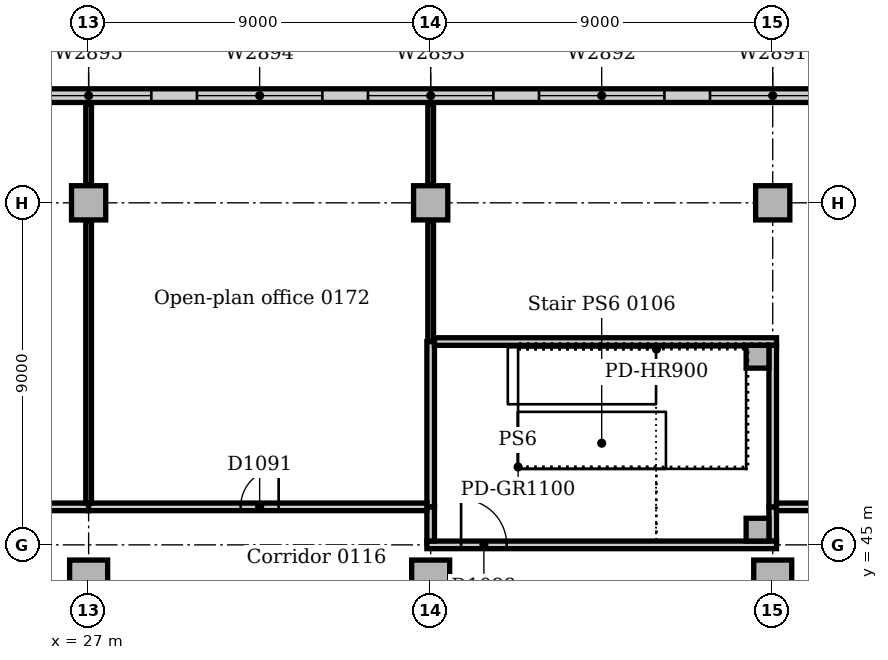
"""IFC4 building model, lengths in metres.
Left out: names, types, materials, properties, quantities, classifications, styles, units other than length and angle.
Written with IfcOpenShell. Run it as: python <this file> out.ifc"""

import sys

from ifc_helpers import new_model, si_unit, direction, frame, frame_2d, origin, origin_2d, place, context, subcontext, project, spatial, rectangle, extrude, element, fill, save


model = new_model("IFC4")
c1 = context("Model", 3, precision=1e-05, world=origin(), true_north=direction((0.0, 1.0)))
c2 = subcontext(c1, "Body", "Model", "MODEL_VIEW")
j1 = project(units=[si_unit("LENGTHUNIT", "METRE"), si_unit("PLANEANGLEUNIT", "RADIAN")], contexts=[c1])
p1 = place(None, origin())
s1 = spatial("IfcSite", under=j1, at=p1, CompositionType="ELEMENT")
p2 = place(p1, origin())
s2 = spatial("IfcBuilding", under=s1, at=p2, CompositionType="ELEMENT")
p3 = place(p2, frame((0.0, 0.0, 6.0)))
s3 = spatial("IfcBuildingStorey", under=s2, at=p3, CompositionType="ELEMENT", Elevation=6.0)
for number, where, z_axis, x_axis in (
    (1, (27.0, 44.1, 0.0), (0.0, 0.0, 1.0), (1.0, 0.0, 0.0)),
    (2, (36.0, 44.1, 0.0), (0.0, 0.0, 1.0), (1.0, 0.0, 0.0)),
    (3, (45.0, 44.1, 0.0), (0.0, 0.0, 1.0), (1.0, 0.0, 0.0)),
):
    element("IfcColumn", number, at=place(p3, frame(where, z_axis=z_axis, x_axis=x_axis)), inside=s3, PredefinedType="COLUMN", context=c2, shape_type="SweptSolid", body=[
        extrude(rectangle(XDim=1.0, YDim=1.0, at=origin_2d()), origin(), (0.0, 0.0, 1.0), 4.7),
    ])
for number, where, z_axis, x_axis in (
    (4, (27.0, 54.0, 0.0), (0.0, 0.0, 1.0), (1.0, 0.0, 0.0)),
    (5, (36.0, 54.0, 0.0), (0.0, 0.0, 1.0), (1.0, 0.0, 0.0)),
    (6, (45.0, 54.0, 0.0), (0.0, 0.0, 1.0), (1.0, 0.0, 0.0)),
):
    element("IfcColumn", number, at=place(p3, frame(where, z_axis=z_axis, x_axis=x_axis)), inside=s3, PredefinedType="COLUMN", context=c2, shape_type="SweptSolid", body=[
        extrude(rectangle(XDim=0.9, YDim=0.9, at=origin_2d()), origin(), (0.0, 0.0, 1.0), 4.7),
    ])
p4 = place(p3, frame((63.0, 56.82, 0.0), z_axis=(0.0, 0.0, 1.0), x_axis=(-1.0, 0.0, 0.0)))
e7 = element("IfcWall", 7, at=p4, inside=s3, PredefinedType="STANDARD", context=c2, shape_type="SweptSolid", body=[
    extrude(rectangle(XDim=144.0, YDim=0.36, at=frame_2d((72.0, 0.0))), origin(), (0.0, 0.0, 1.0), 4.7),
])
p5 = place(p4, frame((2.85, 0.0, 0.9)))
e8 = element("IfcOpeningElement", 8, at=p5, cuts=e7, PredefinedType="OPENING", context=c2, shape_type="SweptSolid", body=[
    extrude(rectangle(XDim=3.3, YDim=2.4, at=frame_2d((1.65, 1.2))), frame((0.0, 0.19, 0.0), z_axis=(0.0, -1.0, 0.0), x_axis=(1.0, 0.0, 0.0)), (0.0, 0.0, 1.0), 0.38),
])
p6 = place(p4, frame((7.35, 0.0, 0.9)))
e9 = element("IfcOpeningElement", 9, at=p6, cuts=e7, PredefinedType="OPENING", context=c2, shape_type="SweptSolid", body=[
    extrude(rectangle(XDim=3.3, YDim=2.4, at=frame_2d((1.65, 1.2))), frame((0.0, 0.19, 0.0), z_axis=(0.0, -1.0, 0.0), x_axis=(1.0, 0.0, 0.0)), (0.0, 0.0, 1.0), 0.38),
])
p7 = place(p4, frame((11.85, 0.0, 0.9)))
e10 = element("IfcOpeningElement", 10, at=p7, cuts=e7, PredefinedType="OPENING", context=c2, shape_type="SweptSolid", body=[
    extrude(rectangle(XDim=3.3, YDim=2.4, at=frame_2d((1.65, 1.2))), frame((0.0, 0.19, 0.0), z_axis=(0.0, -1.0, 0.0), x_axis=(1.0, 0.0, 0.0)), (0.0, 0.0, 1.0), 0.38),
])
p8 = place(p4, frame((16.35, 0.0, 0.9)))
e11 = element("IfcOpeningElement", 11, at=p8, cuts=e7, PredefinedType="OPENING", context=c2, shape_type="SweptSolid", body=[
    extrude(rectangle(XDim=3.3, YDim=2.4, at=frame_2d((1.65, 1.2))), frame((0.0, 0.19, 0.0), z_axis=(0.0, -1.0, 0.0), x_axis=(1.0, 0.0, 0.0)), (0.0, 0.0, 1.0), 0.38),
])
p9 = place(p4, frame((20.85, 0.0, 0.9)))
e12 = element("IfcOpeningElement", 12, at=p9, cuts=e7, PredefinedType="OPENING", context=c2, shape_type="SweptSolid", body=[
    extrude(rectangle(XDim=3.3, YDim=2.4, at=frame_2d((1.65, 1.2))), frame((0.0, 0.19, 0.0), z_axis=(0.0, -1.0, 0.0), x_axis=(1.0, 0.0, 0.0)), (0.0, 0.0, 1.0), 0.38),
])
p10 = place(p4, frame((25.35, 0.0, 0.9)))
e13 = element("IfcOpeningElement", 13, at=p10, cuts=e7, PredefinedType="OPENING", context=c2, shape_type="SweptSolid", body=[
    extrude(rectangle(XDim=3.3, YDim=2.4, at=frame_2d((1.65, 1.2))), frame((0.0, 0.19, 0.0), z_axis=(0.0, -1.0, 0.0), x_axis=(1.0, 0.0, 0.0)), (0.0, 0.0, 1.0), 0.38),
])
p11 = place(p4, frame((29.85, 0.0, 0.9)))
e14 = element("IfcOpeningElement", 14, at=p11, cuts=e7, PredefinedType="OPENING", context=c2, shape_type="SweptSolid", body=[
    extrude(rectangle(XDim=3.3, YDim=2.4, at=frame_2d((1.65, 1.2))), frame((0.0, 0.19, 0.0), z_axis=(0.0, -1.0, 0.0), x_axis=(1.0, 0.0, 0.0)), (0.0, 0.0, 1.0), 0.38),
])
p12 = place(p4, frame((34.35, 0.0, 0.9)))
e15 = element("IfcOpeningElement", 15, at=p12, cuts=e7, PredefinedType="OPENING", context=c2, shape_type="SweptSolid", body=[
    extrude(rectangle(XDim=3.3, YDim=2.4, at=frame_2d((1.65, 1.2))), frame((0.0, 0.19, 0.0), z_axis=(0.0, -1.0, 0.0), x_axis=(1.0, 0.0, 0.0)), (0.0, 0.0, 1.0), 0.38),
])
p13 = place(p4, frame((38.85, 0.0, 0.9)))
e16 = element("IfcOpeningElement", 16, at=p13, cuts=e7, PredefinedType="OPENING", context=c2, shape_type="SweptSolid", body=[
    extrude(rectangle(XDim=3.3, YDim=2.4, at=frame_2d((1.65, 1.2))), frame((0.0, 0.19, 0.0), z_axis=(0.0, -1.0, 0.0), x_axis=(1.0, 0.0, 0.0)), (0.0, 0.0, 1.0), 0.38),
])
p14 = place(p4, frame((43.35, 0.0, 0.9)))
e17 = element("IfcOpeningElement", 17, at=p14, cuts=e7, PredefinedType="OPENING", context=c2, shape_type="SweptSolid", body=[
    extrude(rectangle(XDim=3.3, YDim=2.4, at=frame_2d((1.65, 1.2))), frame((0.0, 0.19, 0.0), z_axis=(0.0, -1.0, 0.0), x_axis=(1.0, 0.0, 0.0)), (0.0, 0.0, 1.0), 0.38),
])
p15 = place(p4, frame((47.85, 0.0, 0.9)))
e18 = element("IfcOpeningElement", 18, at=p15, cuts=e7, PredefinedType="OPENING", context=c2, shape_type="SweptSolid", body=[
    extrude(rectangle(XDim=3.3, YDim=2.4, at=frame_2d((1.65, 1.2))), frame((0.0, 0.19, 0.0), z_axis=(0.0, -1.0, 0.0), x_axis=(1.0, 0.0, 0.0)), (0.0, 0.0, 1.0), 0.38),
])
p16 = place(p4, frame((52.35, 0.0, 0.9)))
e19 = element("IfcOpeningElement", 19, at=p16, cuts=e7, PredefinedType="OPENING", context=c2, shape_type="SweptSolid", body=[
    extrude(rectangle(XDim=3.3, YDim=2.4, at=frame_2d((1.65, 1.2))), frame((0.0, 0.19, 0.0), z_axis=(0.0, -1.0, 0.0), x_axis=(1.0, 0.0, 0.0)), (0.0, 0.0, 1.0), 0.38),
])
p17 = place(p4, frame((56.85, 0.0, 0.9)))
e20 = element("IfcOpeningElement", 20, at=p17, cuts=e7, PredefinedType="OPENING", context=c2, shape_type="SweptSolid", body=[
    extrude(rectangle(XDim=3.3, YDim=2.4, at=frame_2d((1.65, 1.2))), frame((0.0, 0.19, 0.0), z_axis=(0.0, -1.0, 0.0), x_axis=(1.0, 0.0, 0.0)), (0.0, 0.0, 1.0), 0.38),
])
p18 = place(p4, frame((61.35, 0.0, 0.9)))
e21 = element("IfcOpeningElement", 21, at=p18, cuts=e7, PredefinedType="OPENING", context=c2, shape_type="SweptSolid", body=[
    extrude(rectangle(XDim=3.3, YDim=2.4, at=frame_2d((1.65, 1.2))), frame((0.0, 0.19, 0.0), z_axis=(0.0, -1.0, 0.0), x_axis=(1.0, 0.0, 0.0)), (0.0, 0.0, 1.0), 0.38),
])
p19 = place(p4, frame((65.85, 0.0, 0.9)))
e22 = element("IfcOpeningElement", 22, at=p19, cuts=e7, PredefinedType="OPENING", context=c2, shape_type="SweptSolid", body=[
    extrude(rectangle(XDim=3.3, YDim=2.4, at=frame_2d((1.65, 1.2))), frame((0.0, 0.19, 0.0), z_axis=(0.0, -1.0, 0.0), x_axis=(1.0, 0.0, 0.0)), (0.0, 0.0, 1.0), 0.38),
])
p20 = place(p4, frame((70.35, 0.0, 0.9)))
e23 = element("IfcOpeningElement", 23, at=p20, cuts=e7, PredefinedType="OPENING", context=c2, shape_type="SweptSolid", body=[
    extrude(rectangle(XDim=3.3, YDim=2.4, at=frame_2d((1.65, 1.2))), frame((0.0, 0.19, 0.0), z_axis=(0.0, -1.0, 0.0), x_axis=(1.0, 0.0, 0.0)), (0.0, 0.0, 1.0), 0.38),
])
p21 = place(p4, frame((74.85, 0.0, 0.9)))
e24 = element("IfcOpeningElement", 24, at=p21, cuts=e7, PredefinedType="OPENING", context=c2, shape_type="SweptSolid", body=[
    extrude(rectangle(XDim=3.3, YDim=2.4, at=frame_2d((1.65, 1.2))), frame((0.0, 0.19, 0.0), z_axis=(0.0, -1.0, 0.0), x_axis=(1.0, 0.0, 0.0)), (0.0, 0.0, 1.0), 0.38),
])
p22 = place(p4, frame((79.35, 0.0, 0.9)))
e25 = element("IfcOpeningElement", 25, at=p22, cuts=e7, PredefinedType="OPENING", context=c2, shape_type="SweptSolid", body=[
    extrude(rectangle(XDim=3.3, YDim=2.4, at=frame_2d((1.65, 1.2))), frame((0.0, 0.19, 0.0), z_axis=(0.0, -1.0, 0.0), x_axis=(1.0, 0.0, 0.0)), (0.0, 0.0, 1.0), 0.38),
])
p23 = place(p4, frame((83.85, 0.0, 0.9)))
e26 = element("IfcOpeningElement", 26, at=p23, cuts=e7, PredefinedType="OPENING", context=c2, shape_type="SweptSolid", body=[
    extrude(rectangle(XDim=3.3, YDim=2.4, at=frame_2d((1.65, 1.2))), frame((0.0, 0.19, 0.0), z_axis=(0.0, -1.0, 0.0), x_axis=(1.0, 0.0, 0.0)), (0.0, 0.0, 1.0), 0.38),
])
p24 = place(p4, frame((88.35, 0.0, 0.9)))
e27 = element("IfcOpeningElement", 27, at=p24, cuts=e7, PredefinedType="OPENING", context=c2, shape_type="SweptSolid", body=[
    extrude(rectangle(XDim=3.3, YDim=2.4, at=frame_2d((1.65, 1.2))), frame((0.0, 0.19, 0.0), z_axis=(0.0, -1.0, 0.0), x_axis=(1.0, 0.0, 0.0)), (0.0, 0.0, 1.0), 0.38),
])
p25 = place(p4, frame((92.85, 0.0, 0.9)))
e28 = element("IfcOpeningElement", 28, at=p25, cuts=e7, PredefinedType="OPENING", context=c2, shape_type="SweptSolid", body=[
    extrude(rectangle(XDim=3.3, YDim=2.4, at=frame_2d((1.65, 1.2))), frame((0.0, 0.19, 0.0), z_axis=(0.0, -1.0, 0.0), x_axis=(1.0, 0.0, 0.0)), (0.0, 0.0, 1.0), 0.38),
])
p26 = place(p4, frame((97.35, 0.0, 0.9)))
e29 = element("IfcOpeningElement", 29, at=p26, cuts=e7, PredefinedType="OPENING", context=c2, shape_type="SweptSolid", body=[
    extrude(rectangle(XDim=3.3, YDim=2.4, at=frame_2d((1.65, 1.2))), frame((0.0, 0.19, 0.0), z_axis=(0.0, -1.0, 0.0), x_axis=(1.0, 0.0, 0.0)), (0.0, 0.0, 1.0), 0.38),
])
p27 = place(p4, frame((101.85, 0.0, 0.9)))
e30 = element("IfcOpeningElement", 30, at=p27, cuts=e7, PredefinedType="OPENING", context=c2, shape_type="SweptSolid", body=[
    extrude(rectangle(XDim=3.3, YDim=2.4, at=frame_2d((1.65, 1.2))), frame((0.0, 0.19, 0.0), z_axis=(0.0, -1.0, 0.0), x_axis=(1.0, 0.0, 0.0)), (0.0, 0.0, 1.0), 0.38),
])
p28 = place(p4, frame((106.35, 0.0, 0.9)))
e31 = element("IfcOpeningElement", 31, at=p28, cuts=e7, PredefinedType="OPENING", context=c2, shape_type="SweptSolid", body=[
    extrude(rectangle(XDim=3.3, YDim=2.4, at=frame_2d((1.65, 1.2))), frame((0.0, 0.19, 0.0), z_axis=(0.0, -1.0, 0.0), x_axis=(1.0, 0.0, 0.0)), (0.0, 0.0, 1.0), 0.38),
])
p29 = place(p4, frame((110.85, 0.0, 0.9)))
e32 = element("IfcOpeningElement", 32, at=p29, cuts=e7, PredefinedType="OPENING", context=c2, shape_type="SweptSolid", body=[
    extrude(rectangle(XDim=3.3, YDim=2.4, at=frame_2d((1.65, 1.2))), frame((0.0, 0.19, 0.0), z_axis=(0.0, -1.0, 0.0), x_axis=(1.0, 0.0, 0.0)), (0.0, 0.0, 1.0), 0.38),
])
p30 = place(p4, frame((115.35, 0.0, 0.9)))
e33 = element("IfcOpeningElement", 33, at=p30, cuts=e7, PredefinedType="OPENING", context=c2, shape_type="SweptSolid", body=[
    extrude(rectangle(XDim=3.3, YDim=2.4, at=frame_2d((1.65, 1.2))), frame((0.0, 0.19, 0.0), z_axis=(0.0, -1.0, 0.0), x_axis=(1.0, 0.0, 0.0)), (0.0, 0.0, 1.0), 0.38),
])
p31 = place(p4, frame((119.85, 0.0, 0.9)))
e34 = element("IfcOpeningElement", 34, at=p31, cuts=e7, PredefinedType="OPENING", context=c2, shape_type="SweptSolid", body=[
    extrude(rectangle(XDim=3.3, YDim=2.4, at=frame_2d((1.65, 1.2))), frame((0.0, 0.19, 0.0), z_axis=(0.0, -1.0, 0.0), x_axis=(1.0, 0.0, 0.0)), (0.0, 0.0, 1.0), 0.38),
])
p32 = place(p4, frame((124.35, 0.0, 0.9)))
e35 = element("IfcOpeningElement", 35, at=p32, cuts=e7, PredefinedType="OPENING", context=c2, shape_type="SweptSolid", body=[
    extrude(rectangle(XDim=3.3, YDim=2.4, at=frame_2d((1.65, 1.2))), frame((0.0, 0.19, 0.0), z_axis=(0.0, -1.0, 0.0), x_axis=(1.0, 0.0, 0.0)), (0.0, 0.0, 1.0), 0.38),
])
p33 = place(p4, frame((128.85, 0.0, 0.9)))
e36 = element("IfcOpeningElement", 36, at=p33, cuts=e7, PredefinedType="OPENING", context=c2, shape_type="SweptSolid", body=[
    extrude(rectangle(XDim=3.3, YDim=2.4, at=frame_2d((1.65, 1.2))), frame((0.0, 0.19, 0.0), z_axis=(0.0, -1.0, 0.0), x_axis=(1.0, 0.0, 0.0)), (0.0, 0.0, 1.0), 0.38),
])
p34 = place(p4, frame((133.35, 0.0, 0.9)))
e37 = element("IfcOpeningElement", 37, at=p34, cuts=e7, PredefinedType="OPENING", context=c2, shape_type="SweptSolid", body=[
    extrude(rectangle(XDim=3.3, YDim=2.4, at=frame_2d((1.65, 1.2))), frame((0.0, 0.19, 0.0), z_axis=(0.0, -1.0, 0.0), x_axis=(1.0, 0.0, 0.0)), (0.0, 0.0, 1.0), 0.38),
])
p35 = place(p4, frame((137.85, 0.0, 0.9)))
e38 = element("IfcOpeningElement", 38, at=p35, cuts=e7, PredefinedType="OPENING", context=c2, shape_type="SweptSolid", body=[
    extrude(rectangle(XDim=3.3, YDim=2.4, at=frame_2d((1.65, 1.2))), frame((0.0, 0.19, 0.0), z_axis=(0.0, -1.0, 0.0), x_axis=(1.0, 0.0, 0.0)), (0.0, 0.0, 1.0), 0.38),
])
for number, where, z_axis, x_axis in (
    (39, (44.6, 49.95, 0.0), (0.0, 0.0, 1.0), (1.0, 0.0, 0.0)),
    (40, (44.6, 45.4, 0.0), (0.0, 0.0, 1.0), (1.0, 0.0, 0.0)),
):
    element("IfcColumn", number, at=place(p3, frame(where, z_axis=z_axis, x_axis=x_axis)), inside=s3, PredefinedType="COLUMN", context=c2, shape_type="SweptSolid", body=[
        extrude(rectangle(XDim=0.6, YDim=0.6, at=origin_2d()), origin(), (0.0, 0.0, 1.0), 5.0),
    ])
p36 = place(p3, frame((45.0, 45.1, 0.0), z_axis=(0.0, 0.0, 1.0), x_axis=(0.0, 1.0, 0.0)))
e41 = element("IfcWall", 41, at=p36, inside=s3, PredefinedType="SOLIDWALL", context=c2, shape_type="SweptSolid", body=[
    extrude(rectangle(XDim=0.9, YDim=0.2, at=frame_2d((0.45, 0.0))), origin(), (0.0, 0.0, 1.0), 4.7),
])
p37 = place(p3, frame((35.9, 45.0, 0.0), z_axis=(0.0, 0.0, 1.0), x_axis=(1.0, 0.0, 0.0)))
e42 = element("IfcWall", 42, at=p37, inside=s3, PredefinedType="SOLIDWALL", context=c2, shape_type="SweptSolid", body=[
    extrude(rectangle(XDim=9.2, YDim=0.2, at=frame_2d((4.6, 0.0))), origin(), (0.0, 0.0, 1.0), 4.7),
])
p38 = place(p37, frame((0.9, 0.0, 0.0)))
e43 = element("IfcOpeningElement", 43, at=p38, cuts=e42, PredefinedType="OPENING", context=c2, shape_type="SweptSolid", body=[
    extrude(rectangle(XDim=1.2, YDim=2.1, at=frame_2d((0.6, 1.05))), frame((0.0, 0.11, 0.0), z_axis=(0.0, -1.0, 0.0), x_axis=(1.0, 0.0, 0.0)), (0.0, 0.0, 1.0), 0.22),
])
p39 = place(p3, frame((36.0, 45.1, 0.0), z_axis=(0.0, 0.0, 1.0), x_axis=(0.0, 1.0, 0.0)))
e44 = element("IfcWall", 44, at=p39, inside=s3, PredefinedType="SOLIDWALL", context=c2, shape_type="SweptSolid", body=[
    extrude(rectangle(XDim=0.9, YDim=0.2, at=frame_2d((0.45, 0.0))), origin(), (0.0, 0.0, 1.0), 4.7),
])
p40 = place(p3, frame((36.0, 46.0, 0.0), z_axis=(0.0, 0.0, 1.0), x_axis=(0.0, 1.0, 0.0)))
e45 = element("IfcWall", 45, at=p40, inside=s3, PredefinedType="SOLIDWALL", context=c2, shape_type="SweptSolid", body=[
    extrude(rectangle(XDim=4.35, YDim=0.2, at=frame_2d((2.175, 0.0))), origin(), (0.0, 0.0, 1.0), 4.7),
])
p41 = place(p3, frame((36.1, 50.35, 0.0), z_axis=(0.0, 0.0, 1.0), x_axis=(1.0, 0.0, 0.0)))
e46 = element("IfcWall", 46, at=p41, inside=s3, PredefinedType="SOLIDWALL", context=c2, shape_type="SweptSolid", body=[
    extrude(rectangle(XDim=9.0, YDim=0.2, at=frame_2d((4.5, 0.0))), origin(), (0.0, 0.0, 1.0), 4.7),
])
p42 = place(p3, frame((45.0, 46.0, 0.0), z_axis=(0.0, 0.0, 1.0), x_axis=(0.0, 1.0, 0.0)))
e47 = element("IfcWall", 47, at=p42, inside=s3, PredefinedType="SOLIDWALL", context=c2, shape_type="SweptSolid", body=[
    extrude(rectangle(XDim=4.25, YDim=0.2, at=frame_2d((2.125, 0.0))), origin(), (0.0, 0.0, 1.0), 4.7),
])
p43 = place(p3, frame((18.0, 46.0, 0.0), z_axis=(0.0, 0.0, 1.0), x_axis=(1.0, 0.0, 0.0)))
e48 = element("IfcWall", 48, at=p43, inside=s3, PredefinedType="PARTITIONING", context=c2, shape_type="SweptSolid", body=[
    extrude(rectangle(XDim=9.0, YDim=0.2, at=frame_2d((4.5, 0.0))), origin(), (0.0, 0.0, 1.0), 4.7),
])
p44 = place(p43, frame((4.0, 0.0, 0.0)))
e49 = element("IfcOpeningElement", 49, at=p44, cuts=e48, PredefinedType="OPENING", context=c2, shape_type="SweptSolid", body=[
    extrude(rectangle(XDim=1.0, YDim=2.1, at=frame_2d((0.5, 1.05))), frame((0.0, 0.11, 0.0), z_axis=(0.0, -1.0, 0.0), x_axis=(1.0, 0.0, 0.0)), (0.0, 0.0, 1.0), 0.22),
])
p45 = place(p3, frame((27.0, 46.0, 0.0), z_axis=(0.0, 0.0, 1.0), x_axis=(1.0, 0.0, 0.0)))
e50 = element("IfcWall", 50, at=p45, inside=s3, PredefinedType="PARTITIONING", context=c2, shape_type="SweptSolid", body=[
    extrude(rectangle(XDim=8.9, YDim=0.2, at=frame_2d((4.45, 0.0))), origin(), (0.0, 0.0, 1.0), 4.7),
])
p46 = place(p45, frame((4.0, 0.0, 0.0)))
e51 = element("IfcOpeningElement", 51, at=p46, cuts=e50, PredefinedType="OPENING", context=c2, shape_type="SweptSolid", body=[
    extrude(rectangle(XDim=1.0, YDim=2.1, at=frame_2d((0.5, 1.05))), frame((0.0, 0.11, 0.0), z_axis=(0.0, -1.0, 0.0), x_axis=(1.0, 0.0, 0.0)), (0.0, 0.0, 1.0), 0.22),
])
p47 = place(p3, frame((45.1, 46.0, 0.0), z_axis=(0.0, 0.0, 1.0), x_axis=(1.0, 0.0, 0.0)))
e52 = element("IfcWall", 52, at=p47, inside=s3, PredefinedType="PARTITIONING", context=c2, shape_type="SweptSolid", body=[
    extrude(rectangle(XDim=8.8, YDim=0.2, at=frame_2d((4.4, 0.0))), origin(), (0.0, 0.0, 1.0), 4.7),
])
p48 = place(p47, frame((3.5, 0.0, 0.0)))
e53 = element("IfcOpeningElement", 53, at=p48, cuts=e52, PredefinedType="OPENING", context=c2, shape_type="SweptSolid", body=[
    extrude(rectangle(XDim=1.8, YDim=2.1, at=frame_2d((0.9, 1.05))), frame((0.0, 0.11, 0.0), z_axis=(0.0, -1.0, 0.0), x_axis=(1.0, 0.0, 0.0)), (0.0, 0.0, 1.0), 0.22),
])
p49 = place(p3, frame((27.0, 46.1, 0.0), z_axis=(0.0, 0.0, 1.0), x_axis=(0.0, 1.0, 0.0)))
e54 = element("IfcWall", 54, at=p49, inside=s3, PredefinedType="PARTITIONING", context=c2, shape_type="SweptSolid", body=[
    extrude(rectangle(XDim=7.43, YDim=0.15, at=frame_2d((3.715, 0.0))), origin(), (0.0, 0.0, 1.0), 4.7),
])
p50 = place(p3, frame((27.0, 54.47, 0.0), z_axis=(0.0, 0.0, 1.0), x_axis=(0.0, 1.0, 0.0)))
e55 = element("IfcWall", 55, at=p50, inside=s3, PredefinedType="PARTITIONING", context=c2, shape_type="SweptSolid", body=[
    extrude(rectangle(XDim=2.13, YDim=0.15, at=frame_2d((1.065, 0.0))), origin(), (0.0, 0.0, 1.0), 4.7),
])
p51 = place(p3, frame((36.0, 50.35, 0.0), z_axis=(0.0, 0.0, 1.0), x_axis=(0.0, 1.0, 0.0)))
e56 = element("IfcWall", 56, at=p51, inside=s3, PredefinedType="PARTITIONING", context=c2, shape_type="SweptSolid", body=[
    extrude(rectangle(XDim=3.18, YDim=0.15, at=frame_2d((1.59, 0.0))), origin(), (0.0, 0.0, 1.0), 4.7),
])
p52 = place(p3, frame((36.0, 54.47, 0.0), z_axis=(0.0, 0.0, 1.0), x_axis=(0.0, 1.0, 0.0)))
e57 = element("IfcWall", 57, at=p52, inside=s3, PredefinedType="PARTITIONING", context=c2, shape_type="SweptSolid", body=[
    extrude(rectangle(XDim=2.13, YDim=0.15, at=frame_2d((1.065, 0.0))), origin(), (0.0, 0.0, 1.0), 4.7),
])
p53 = place(p8, origin())
e58 = element("IfcWindow", 58, at=p53, inside=s3, PartitioningType="SINGLE_PANEL", PredefinedType="WINDOW", context=c2, shape_type="SweptSolid", body=[
    extrude(rectangle(XDim=3.3, YDim=2.4, at=frame_2d((1.65, 1.2))), frame((0.0, 0.13, 0.0), z_axis=(0.0, -1.0, 0.0), x_axis=(1.0, 0.0, 0.0)), (0.0, 0.0, 1.0), 0.06),
])
fill(e11, e58)
p54 = place(p9, origin())
e59 = element("IfcWindow", 59, at=p54, inside=s3, PartitioningType="SINGLE_PANEL", PredefinedType="WINDOW", context=c2, shape_type="SweptSolid", body=[
    extrude(rectangle(XDim=3.3, YDim=2.4, at=frame_2d((1.65, 1.2))), frame((0.0, 0.13, 0.0), z_axis=(0.0, -1.0, 0.0), x_axis=(1.0, 0.0, 0.0)), (0.0, 0.0, 1.0), 0.06),
])
fill(e12, e59)
p55 = place(p10, origin())
e60 = element("IfcWindow", 60, at=p55, inside=s3, PartitioningType="SINGLE_PANEL", PredefinedType="WINDOW", context=c2, shape_type="SweptSolid", body=[
    extrude(rectangle(XDim=3.3, YDim=2.4, at=frame_2d((1.65, 1.2))), frame((0.0, 0.13, 0.0), z_axis=(0.0, -1.0, 0.0), x_axis=(1.0, 0.0, 0.0)), (0.0, 0.0, 1.0), 0.06),
])
fill(e13, e60)
p56 = place(p11, origin())
e61 = element("IfcWindow", 61, at=p56, inside=s3, PartitioningType="SINGLE_PANEL", PredefinedType="WINDOW", context=c2, shape_type="SweptSolid", body=[
    extrude(rectangle(XDim=3.3, YDim=2.4, at=frame_2d((1.65, 1.2))), frame((0.0, 0.13, 0.0), z_axis=(0.0, -1.0, 0.0), x_axis=(1.0, 0.0, 0.0)), (0.0, 0.0, 1.0), 0.06),
])
fill(e14, e61)
p57 = place(p12, origin())
e62 = element("IfcWindow", 62, at=p57, inside=s3, PartitioningType="SINGLE_PANEL", PredefinedType="WINDOW", context=c2, shape_type="SweptSolid", body=[
    extrude(rectangle(XDim=3.3, YDim=2.4, at=frame_2d((1.65, 1.2))), frame((0.0, 0.13, 0.0), z_axis=(0.0, -1.0, 0.0), x_axis=(1.0, 0.0, 0.0)), (0.0, 0.0, 1.0), 0.06),
])
fill(e15, e62)
p58 = place(p46, origin())
e63 = element("IfcDoor", 63, at=p58, inside=s3, OperationType="SINGLE_SWING_RIGHT", PredefinedType="DOOR", context=c2, shape_type="SweptSolid", body=[
    extrude(rectangle(XDim=1.0, YDim=2.1, at=frame_2d((0.5, 1.05))), frame((0.0, 0.025, 0.0), z_axis=(0.0, -1.0, 0.0), x_axis=(1.0, 0.0, 0.0)), (0.0, 0.0, 1.0), 0.05),
])
fill(e51, e63)
p59 = place(p38, origin())
e64 = element("IfcDoor", 64, at=p59, inside=s3, OperationType="SINGLE_SWING_LEFT", PredefinedType="DOOR", context=c2, shape_type="SweptSolid", body=[
    extrude(rectangle(XDim=1.2, YDim=2.1, at=frame_2d((0.6, 1.05))), frame((0.0, 0.025, 0.0), z_axis=(0.0, -1.0, 0.0), x_axis=(1.0, 0.0, 0.0)), (0.0, 0.0, 1.0), 0.05),
])
fill(e43, e64)
save(model, sys.argv[1])
